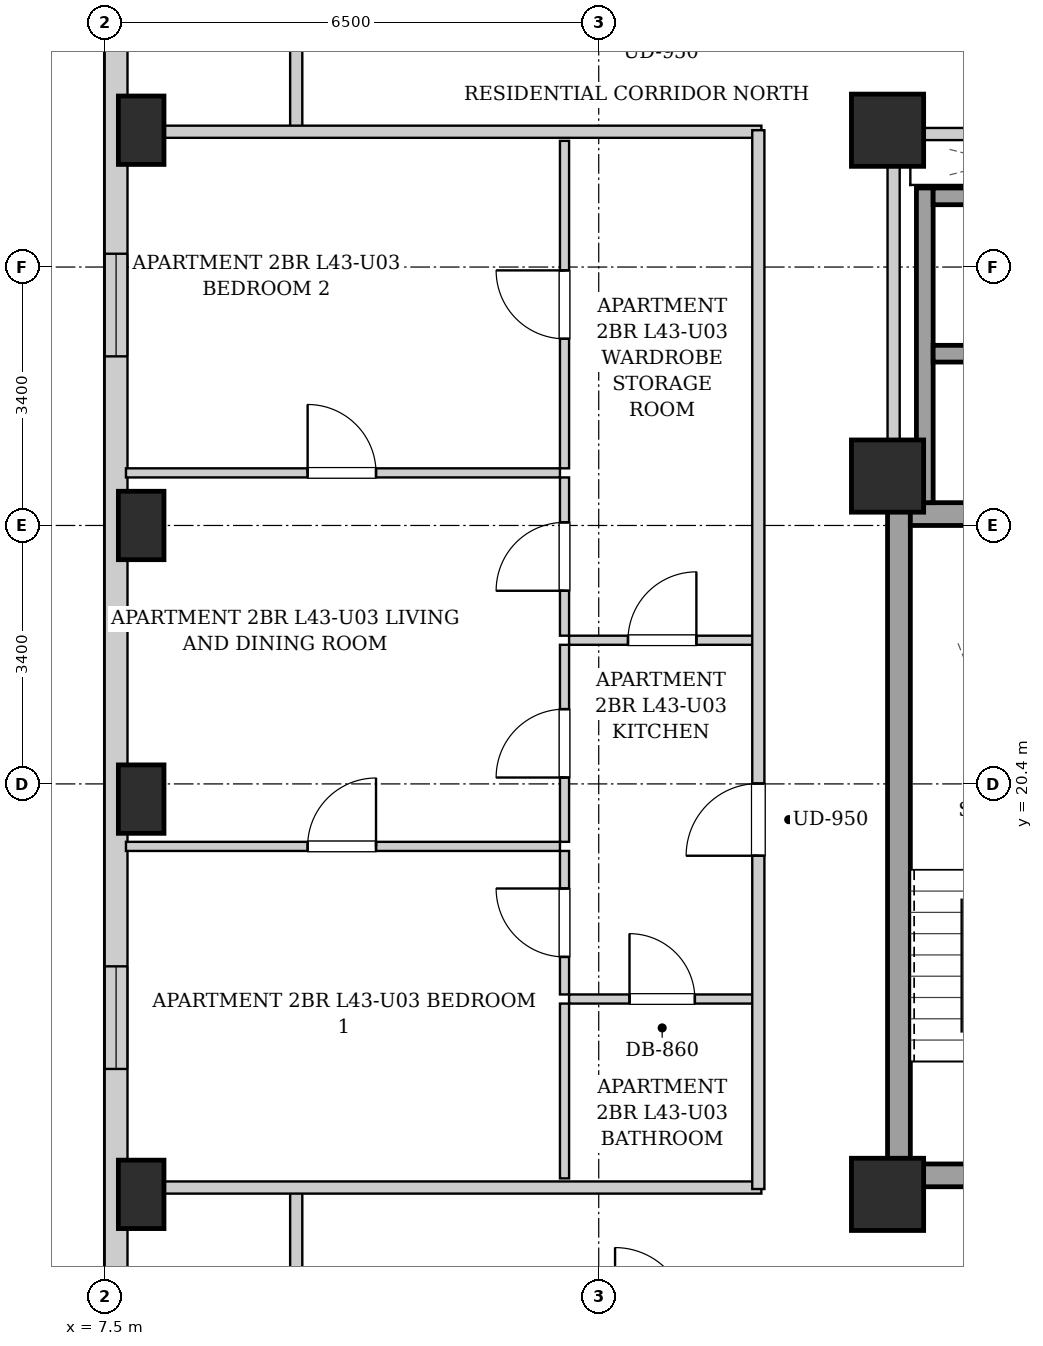
"""IFC4 building model, lengths in metres.
Left out: names, types, materials, properties, quantities, classifications, styles, units other than length and angle.
Written with IfcOpenShell. Run it as: python <this file> out.ifc"""

import sys

from ifc_helpers import new_model, si_unit, direction, frame, frame_2d, origin, origin_2d, place, context, subcontext, project, spatial, rectangle, extrude, element, fill, save


model = new_model("IFC4")
c1 = context("Model", 3, precision=1e-05, world=origin(), true_north=direction((0.0, 1.0)))
c2 = subcontext(c1, "Body", "Model", "MODEL_VIEW")
j1 = project(units=[si_unit("LENGTHUNIT", "METRE"), si_unit("PLANEANGLEUNIT", "RADIAN")], contexts=[c1])
p1 = place(None, origin())
s1 = spatial("IfcSite", under=j1, at=p1, CompositionType="ELEMENT")
p2 = place(p1, origin())
s2 = spatial("IfcBuilding", under=s1, at=p2, CompositionType="ELEMENT")
p3 = place(p2, frame((0.0, 0.0, 150.4)))
s3 = spatial("IfcBuildingStorey", under=s2, at=p3, CompositionType="ELEMENT", Elevation=150.4)
for number, where, z_axis, x_axis in (
    (1, (7.98, 15.0, 0.0), (0.0, 0.0, 1.0), (1.0, 0.0, 0.0)),
    (2, (7.98, 20.2, 0.0), (0.0, 0.0, 1.0), (1.0, 0.0, 0.0)),
    (3, (7.98, 23.8, 0.0), (0.0, 0.0, 1.0), (1.0, 0.0, 0.0)),
    (4, (7.98, 29.0, 0.0), (0.0, 0.0, 1.0), (1.0, 0.0, 0.0)),
):
    element("IfcColumn", number, at=place(p3, frame(where, z_axis=z_axis, x_axis=x_axis)), inside=s3, PredefinedType="COLUMN", context=c2, shape_type="SweptSolid", body=[
        extrude(rectangle(XDim=0.6, YDim=0.9, at=origin_2d()), origin(), (0.0, 0.0, 1.0), 3.25),
    ])
for number, where, z_axis, x_axis in (
    (5, (17.8, 15.0, 0.0), (0.0, 0.0, 1.0), (1.0, 0.0, 0.0)),
    (6, (17.8, 29.0, 0.0), (0.0, 0.0, 1.0), (1.0, 0.0, 0.0)),
    (7, (17.8, 24.45, 0.0), (0.0, 0.0, 1.0), (1.0, 0.0, 0.0)),
):
    element("IfcColumn", number, at=place(p3, frame(where, z_axis=z_axis, x_axis=x_axis)), inside=s3, PredefinedType="COLUMN", context=c2, shape_type="SweptSolid", body=[
        extrude(rectangle(XDim=0.95, YDim=0.95, at=origin_2d()), origin(), (0.0, 0.0, 1.0), 3.25),
    ])
p4 = place(p3, frame((7.65, 6.3, 0.0), z_axis=(0.0, 0.0, 1.0), x_axis=(0.0, 1.0, 0.0)))
e8 = element("IfcWall", 8, at=p4, inside=s3, PredefinedType="SOLIDWALL", context=c2, shape_type="SweptSolid", body=[
    extrude(rectangle(XDim=34.5, YDim=0.3, at=frame_2d((17.25, 0.0))), origin(), (0.0, 0.0, 1.0), 2.99),
])
p5 = place(p4, frame((1.425, 0.0, 0.55)))
e9 = element("IfcOpeningElement", 9, at=p5, cuts=e8, PredefinedType="OPENING", context=c2, shape_type="SweptSolid", body=[
    extrude(rectangle(XDim=1.35, YDim=1.2, at=frame_2d((0.675, 0.6))), frame((0.0, 0.16, 0.0), z_axis=(0.0, -1.0, 0.0), x_axis=(1.0, 0.0, 0.0)), (0.0, 0.0, 1.0), 0.32),
])
p6 = place(p4, frame((30.15, 0.0, 0.55)))
e10 = element("IfcOpeningElement", 10, at=p6, cuts=e8, PredefinedType="OPENING", context=c2, shape_type="SweptSolid", body=[
    extrude(rectangle(XDim=1.35, YDim=1.2, at=frame_2d((0.675, 0.6))), frame((0.0, 0.16, 0.0), z_axis=(0.0, -1.0, 0.0), x_axis=(1.0, 0.0, 0.0)), (0.0, 0.0, 1.0), 0.32),
])
p7 = place(p4, frame((28.31, 0.0, 0.55)))
e11 = element("IfcOpeningElement", 11, at=p7, cuts=e8, PredefinedType="OPENING", context=c2, shape_type="SweptSolid", body=[
    extrude(rectangle(XDim=1.35, YDim=1.2, at=frame_2d((0.675, 0.6))), frame((0.0, 0.16, 0.0), z_axis=(0.0, -1.0, 0.0), x_axis=(1.0, 0.0, 0.0)), (0.0, 0.0, 1.0), 0.32),
])
p8 = place(p4, frame((10.35, 0.0, 0.55)))
e12 = element("IfcOpeningElement", 12, at=p8, cuts=e8, PredefinedType="OPENING", context=c2, shape_type="SweptSolid", body=[
    extrude(rectangle(XDim=1.35, YDim=1.2, at=frame_2d((0.675, 0.6))), frame((0.0, 0.16, 0.0), z_axis=(0.0, -1.0, 0.0), x_axis=(1.0, 0.0, 0.0)), (0.0, 0.0, 1.0), 0.32),
])
p9 = place(p4, frame((19.725, 0.0, 0.55)))
e13 = element("IfcOpeningElement", 13, at=p9, cuts=e8, PredefinedType="OPENING", context=c2, shape_type="SweptSolid", body=[
    extrude(rectangle(XDim=1.35, YDim=1.2, at=frame_2d((0.675, 0.6))), frame((0.0, 0.16, 0.0), z_axis=(0.0, -1.0, 0.0), x_axis=(1.0, 0.0, 0.0)), (0.0, 0.0, 1.0), 0.32),
])
p10 = place(p3, frame((17.95, 15.1, 0.0), z_axis=(0.0, 0.0, 1.0), x_axis=(0.0, 1.0, 0.0)))
e14 = element("IfcWall", 14, at=p10, inside=s3, PredefinedType="SHEAR", context=c2, shape_type="SweptSolid", body=[
    extrude(rectangle(XDim=9.0, YDim=0.3, at=frame_2d((4.5, 0.0))), origin(), (0.0, 0.0, 1.0), 2.99),
])
p11 = place(p3, frame((18.1, 23.95, 0.0), z_axis=(0.0, 0.0, 1.0), x_axis=(1.0, 0.0, 0.0)))
e15 = element("IfcWall", 15, at=p11, inside=s3, PredefinedType="SHEAR", context=c2, shape_type="SweptSolid", body=[
    extrude(rectangle(XDim=2.85, YDim=0.3, at=frame_2d((1.425, 0.0))), origin(), (0.0, 0.0, 1.0), 2.99),
])
p12 = place(p3, frame((18.1, 15.25, 0.0), z_axis=(0.0, 0.0, 1.0), x_axis=(1.0, 0.0, 0.0)))
e16 = element("IfcWall", 16, at=p12, inside=s3, PredefinedType="SHEAR", context=c2, shape_type="SweptSolid", body=[
    extrude(rectangle(XDim=2.85, YDim=0.3, at=frame_2d((1.425, 0.0))), origin(), (0.0, 0.0, 1.0), 2.99),
])
p13 = place(p12, frame((0.86, 0.0, 0.0)))
e17 = element("IfcOpeningElement", 17, at=p13, cuts=e16, PredefinedType="OPENING", context=c2, shape_type="SweptSolid", body=[
    extrude(rectangle(XDim=1.1, YDim=2.05, at=frame_2d((0.55, 1.025))), frame((0.0, 0.16, 0.0), z_axis=(0.0, -1.0, 0.0), x_axis=(1.0, 0.0, 0.0)), (0.0, 0.0, 1.0), 0.32),
])
p14 = place(p3, frame((18.29, 24.1, 0.0), z_axis=(0.0, 0.0, 1.0), x_axis=(0.0, 1.0, 0.0)))
e18 = element("IfcWall", 18, at=p14, inside=s3, PredefinedType="SHEAR", context=c2, shape_type="SweptSolid", body=[
    extrude(rectangle(XDim=4.14, YDim=0.22, at=frame_2d((2.07, 0.0))), origin(), (0.0, 0.0, 1.0), 2.99),
])
for number, where, z_axis, x_axis in (
    (19, (18.4, 26.06, 0.0), (0.0, 0.0, 1.0), (1.0, 0.0, 0.0)),
    (20, (18.4, 28.13, 0.0), (0.0, 0.0, 1.0), (1.0, 0.0, 0.0)),
):
    element("IfcWall", number, at=place(p3, frame(where, z_axis=z_axis, x_axis=x_axis)), inside=s3, PredefinedType="SHEAR", context=c2, shape_type="SweptSolid", body=[
        extrude(rectangle(XDim=1.9, YDim=0.22, at=frame_2d((0.95, 0.0))), origin(), (0.0, 0.0, 1.0), 2.99),
    ])
p15 = place(p3, frame((17.88, 24.12, 0.0), z_axis=(0.0, 0.0, 1.0), x_axis=(0.0, 1.0, 0.0)))
e21 = element("IfcWall", 21, at=p15, inside=s3, PredefinedType="PARTITIONING", context=c2, shape_type="SweptSolid", body=[
    extrude(rectangle(XDim=4.76, YDim=0.16, at=frame_2d((2.38, 0.0))), origin(), (0.0, 0.0, 1.0), 2.99),
])
p16 = place(p3, frame((17.96, 28.95, 0.0), z_axis=(0.0, 0.0, 1.0), x_axis=(1.0, 0.0, 0.0)))
e22 = element("IfcWall", 22, at=p16, inside=s3, PredefinedType="PARTITIONING", context=c2, shape_type="SweptSolid", body=[
    extrude(rectangle(XDim=4.29, YDim=0.16, at=frame_2d((2.145, 0.0))), origin(), (0.0, 0.0, 1.0), 2.442),
])
p17 = place(p16, frame((1.695, 0.0, 0.0)))
e23 = element("IfcOpeningElement", 23, at=p17, cuts=e22, PredefinedType="OPENING", context=c2, shape_type="SweptSolid", body=[
    extrude(rectangle(XDim=0.86, YDim=2.05, at=frame_2d((0.43, 1.025))), frame((0.0, 0.09, 0.0), z_axis=(0.0, -1.0, 0.0), x_axis=(1.0, 0.0, 0.0)), (0.0, 0.0, 1.0), 0.18),
])
for number, where, z_axis, x_axis in (
    (24, (10.02, 13.35, 0.0), (0.0, 0.0, 1.0), (0.0, 1.0, 0.0)),
    (25, (10.02, 28.98, 0.0), (0.0, 0.0, 1.0), (0.0, 1.0, 0.0)),
):
    element("IfcWall", number, at=place(p3, frame(where, z_axis=z_axis, x_axis=x_axis)), inside=s3, PredefinedType="PARTITIONING", context=c2, shape_type="SweptSolid", body=[
        extrude(rectangle(XDim=1.74, YDim=0.16, at=frame_2d((0.87, 0.0))), origin(), (0.0, 0.0, 1.0), 2.99),
    ])
for number, where, z_axis, x_axis in (
    (26, (7.78, 15.09, 0.0), (0.0, 0.0, 1.0), (1.0, 0.0, 0.0)),
    (27, (7.78, 28.98, 0.0), (0.0, 0.0, 1.0), (1.0, 0.0, 0.0)),
):
    element("IfcWall", number, at=place(p3, frame(where, z_axis=z_axis, x_axis=x_axis)), inside=s3, PredefinedType="PARTITIONING", context=c2, shape_type="SweptSolid", body=[
        extrude(rectangle(XDim=8.36, YDim=0.16, at=frame_2d((4.18, 0.0))), origin(), (0.0, 0.0, 1.0), 2.442),
    ])
p18 = place(p3, frame((13.61, 22.29, 0.0), z_axis=(0.0, 0.0, 1.0), x_axis=(1.0, 0.0, 0.0)))
e28 = element("IfcWall", 28, at=p18, inside=s3, PredefinedType="PARTITIONING", context=c2, shape_type="SweptSolid", body=[
    extrude(rectangle(XDim=2.45, YDim=0.12, at=frame_2d((1.225, 0.0))), origin(), (0.0, 0.0, 1.0), 2.99),
])
p19 = place(p18, frame((0.775, 0.0, 0.0)))
e29 = element("IfcOpeningElement", 29, at=p19, cuts=e28, PredefinedType="OPENING", context=c2, shape_type="SweptSolid", body=[
    extrude(rectangle(XDim=0.9, YDim=2.05, at=frame_2d((0.45, 1.025))), frame((0.0, 0.07, 0.0), z_axis=(0.0, -1.0, 0.0), x_axis=(1.0, 0.0, 0.0)), (0.0, 0.0, 1.0), 0.14),
])
p20 = place(p3, frame((13.55, 22.35, 0.0), z_axis=(0.0, 0.0, 1.0), x_axis=(0.0, 1.0, 0.0)))
e30 = element("IfcWall", 30, at=p20, inside=s3, PredefinedType="PARTITIONING", context=c2, shape_type="SweptSolid", body=[
    extrude(rectangle(XDim=2.082, YDim=0.12, at=frame_2d((1.041, 0.0))), origin(), (0.0, 0.0, 1.0), 2.99),
])
p21 = place(p20, frame((0.591, 0.0, 0.0)))
e31 = element("IfcOpeningElement", 31, at=p21, cuts=e30, PredefinedType="OPENING", context=c2, shape_type="SweptSolid", body=[
    extrude(rectangle(XDim=0.9, YDim=2.05, at=frame_2d((0.45, 1.025))), frame((0.0, 0.07, 0.0), z_axis=(0.0, -1.0, 0.0), x_axis=(1.0, 0.0, 0.0)), (0.0, 0.0, 1.0), 0.14),
])
p22 = place(p3, frame((13.55, 24.552, 0.0), z_axis=(0.0, 0.0, 1.0), x_axis=(0.0, 1.0, 0.0)))
e32 = element("IfcWall", 32, at=p22, inside=s3, PredefinedType="PARTITIONING", context=c2, shape_type="SweptSolid", body=[
    extrude(rectangle(XDim=4.308, YDim=0.12, at=frame_2d((2.154, 0.0))), origin(), (0.0, 0.0, 1.0), 2.99),
])
p23 = place(p22, frame((1.704, 0.0, 0.0)))
e33 = element("IfcOpeningElement", 33, at=p23, cuts=e32, PredefinedType="OPENING", context=c2, shape_type="SweptSolid", body=[
    extrude(rectangle(XDim=0.9, YDim=2.05, at=frame_2d((0.45, 1.025))), frame((0.0, 0.07, 0.0), z_axis=(0.0, -1.0, 0.0), x_axis=(1.0, 0.0, 0.0)), (0.0, 0.0, 1.0), 0.14),
])
p24 = place(p3, frame((13.61, 17.57, 0.0), z_axis=(0.0, 0.0, 1.0), x_axis=(1.0, 0.0, 0.0)))
e34 = element("IfcWall", 34, at=p24, inside=s3, PredefinedType="PARTITIONING", context=c2, shape_type="SweptSolid", body=[
    extrude(rectangle(XDim=2.45, YDim=0.12, at=frame_2d((1.225, 0.0))), origin(), (0.0, 0.0, 1.0), 2.99),
])
p25 = place(p24, frame((0.795, 0.0, 0.0)))
e35 = element("IfcOpeningElement", 35, at=p25, cuts=e34, PredefinedType="OPENING", context=c2, shape_type="SweptSolid", body=[
    extrude(rectangle(XDim=0.86, YDim=2.05, at=frame_2d((0.43, 1.025))), frame((0.0, 0.07, 0.0), z_axis=(0.0, -1.0, 0.0), x_axis=(1.0, 0.0, 0.0)), (0.0, 0.0, 1.0), 0.14),
])
p26 = place(p3, frame((13.55, 15.21, 0.0), z_axis=(0.0, 0.0, 1.0), x_axis=(0.0, 1.0, 0.0)))
e36 = element("IfcWall", 36, at=p26, inside=s3, PredefinedType="PARTITIONING", context=c2, shape_type="SweptSolid", body=[
    extrude(rectangle(XDim=2.3, YDim=0.12, at=frame_2d((1.15, 0.0))), origin(), (0.0, 0.0, 1.0), 2.99),
])
p27 = place(p3, frame((13.55, 17.63, 0.0), z_axis=(0.0, 0.0, 1.0), x_axis=(0.0, 1.0, 0.0)))
e37 = element("IfcWall", 37, at=p27, inside=s3, PredefinedType="PARTITIONING", context=c2, shape_type="SweptSolid", body=[
    extrude(rectangle(XDim=1.888, YDim=0.12, at=frame_2d((0.944, 0.0))), origin(), (0.0, 0.0, 1.0), 2.99),
])
p28 = place(p27, frame((0.494, 0.0, 0.0)))
e38 = element("IfcOpeningElement", 38, at=p28, cuts=e37, PredefinedType="OPENING", context=c2, shape_type="SweptSolid", body=[
    extrude(rectangle(XDim=0.9, YDim=2.05, at=frame_2d((0.45, 1.025))), frame((0.0, 0.07, 0.0), z_axis=(0.0, -1.0, 0.0), x_axis=(1.0, 0.0, 0.0)), (0.0, 0.0, 1.0), 0.14),
])
p29 = place(p3, frame((13.55, 19.638, 0.0), z_axis=(0.0, 0.0, 1.0), x_axis=(0.0, 1.0, 0.0)))
e39 = element("IfcWall", 39, at=p29, inside=s3, PredefinedType="PARTITIONING", context=c2, shape_type="SweptSolid", body=[
    extrude(rectangle(XDim=2.592, YDim=0.12, at=frame_2d((1.296, 0.0))), origin(), (0.0, 0.0, 1.0), 2.99),
])
p30 = place(p29, frame((0.846, 0.0, 0.0)))
e40 = element("IfcOpeningElement", 40, at=p30, cuts=e39, PredefinedType="OPENING", context=c2, shape_type="SweptSolid", body=[
    extrude(rectangle(XDim=0.9, YDim=2.05, at=frame_2d((0.45, 1.025))), frame((0.0, 0.07, 0.0), z_axis=(0.0, -1.0, 0.0), x_axis=(1.0, 0.0, 0.0)), (0.0, 0.0, 1.0), 0.14),
])
p31 = place(p3, frame((7.78, 19.578, 0.0), z_axis=(0.0, 0.0, 1.0), x_axis=(1.0, 0.0, 0.0)))
e41 = element("IfcWall", 41, at=p31, inside=s3, PredefinedType="PARTITIONING", context=c2, shape_type="SweptSolid", body=[
    extrude(rectangle(XDim=5.71, YDim=0.12, at=frame_2d((2.855, 0.0))), origin(), (0.0, 0.0, 1.0), 2.99),
])
p32 = place(p31, frame((2.39, 0.0, 0.0)))
e42 = element("IfcOpeningElement", 42, at=p32, cuts=e41, PredefinedType="OPENING", context=c2, shape_type="SweptSolid", body=[
    extrude(rectangle(XDim=0.9, YDim=2.05, at=frame_2d((0.45, 1.025))), frame((0.0, 0.07, 0.0), z_axis=(0.0, -1.0, 0.0), x_axis=(1.0, 0.0, 0.0)), (0.0, 0.0, 1.0), 0.14),
])
p33 = place(p3, frame((7.78, 24.492, 0.0), z_axis=(0.0, 0.0, 1.0), x_axis=(1.0, 0.0, 0.0)))
e43 = element("IfcWall", 43, at=p33, inside=s3, PredefinedType="PARTITIONING", context=c2, shape_type="SweptSolid", body=[
    extrude(rectangle(XDim=5.71, YDim=0.12, at=frame_2d((2.855, 0.0))), origin(), (0.0, 0.0, 1.0), 2.621),
])
p34 = place(p33, frame((2.39, 0.0, 0.0)))
e44 = element("IfcOpeningElement", 44, at=p34, cuts=e43, PredefinedType="OPENING", context=c2, shape_type="SweptSolid", body=[
    extrude(rectangle(XDim=0.9, YDim=2.05, at=frame_2d((0.45, 1.025))), frame((0.0, 0.07, 0.0), z_axis=(0.0, -1.0, 0.0), x_axis=(1.0, 0.0, 0.0)), (0.0, 0.0, 1.0), 0.14),
])
p35 = place(p3, frame((16.1, 15.07, 0.0), z_axis=(0.0, 0.0, 1.0), x_axis=(0.0, 1.0, 0.0)))
e45 = element("IfcWall", 45, at=p35, inside=s3, PredefinedType="PARTITIONING", context=c2, shape_type="SweptSolid", body=[
    extrude(rectangle(XDim=13.93, YDim=0.16, at=frame_2d((6.965, 0.0))), origin(), (0.0, 0.0, 1.0), 2.99),
])
p36 = place(p35, frame((4.385, 0.0, 0.0)))
e46 = element("IfcOpeningElement", 46, at=p36, cuts=e45, PredefinedType="OPENING", context=c2, shape_type="SweptSolid", body=[
    extrude(rectangle(XDim=0.95, YDim=2.1, at=frame_2d((0.475, 1.05))), frame((0.0, 0.09, 0.0), z_axis=(0.0, -1.0, 0.0), x_axis=(1.0, 0.0, 0.0)), (0.0, 0.0, 1.0), 0.18),
])
p37 = place(p19, origin())
e47 = element("IfcDoor", 47, at=p37, inside=s3, OperationType="SINGLE_SWING_RIGHT", PredefinedType="DOOR", context=c2, shape_type="SweptSolid", body=[
    extrude(rectangle(XDim=0.9, YDim=2.05, at=frame_2d((0.45, 1.025))), frame((0.0, 0.025, 0.0), z_axis=(0.0, -1.0, 0.0), x_axis=(1.0, 0.0, 0.0)), (0.0, 0.0, 1.0), 0.05),
])
fill(e29, e47)
p38 = place(p21, origin())
e48 = element("IfcDoor", 48, at=p38, inside=s3, OperationType="SINGLE_SWING_LEFT", PredefinedType="DOOR", context=c2, shape_type="SweptSolid", body=[
    extrude(rectangle(XDim=0.9, YDim=2.05, at=frame_2d((0.45, 1.025))), frame((0.0, 0.025, 0.0), z_axis=(0.0, -1.0, 0.0), x_axis=(1.0, 0.0, 0.0)), (0.0, 0.0, 1.0), 0.05),
])
fill(e31, e48)
p39 = place(p23, origin())
e49 = element("IfcDoor", 49, at=p39, inside=s3, OperationType="SINGLE_SWING_RIGHT", PredefinedType="DOOR", context=c2, shape_type="SweptSolid", body=[
    extrude(rectangle(XDim=0.9, YDim=2.05, at=frame_2d((0.45, 1.025))), frame((0.0, 0.025, 0.0), z_axis=(0.0, -1.0, 0.0), x_axis=(1.0, 0.0, 0.0)), (0.0, 0.0, 1.0), 0.05),
])
fill(e33, e49)
p40 = place(p25, origin())
e50 = element("IfcDoor", 50, at=p40, inside=s3, OperationType="SINGLE_SWING_LEFT", PredefinedType="DOOR", context=c2, shape_type="SweptSolid", body=[
    extrude(rectangle(XDim=0.86, YDim=2.05, at=frame_2d((0.43, 1.025))), frame((0.0, 0.025, 0.0), z_axis=(0.0, -1.0, 0.0), x_axis=(1.0, 0.0, 0.0)), (0.0, 0.0, 1.0), 0.05),
])
fill(e35, e50)
p41 = place(p28, origin())
e51 = element("IfcDoor", 51, at=p41, inside=s3, OperationType="SINGLE_SWING_RIGHT", PredefinedType="DOOR", context=c2, shape_type="SweptSolid", body=[
    extrude(rectangle(XDim=0.9, YDim=2.05, at=frame_2d((0.45, 1.025))), frame((0.0, 0.025, 0.0), z_axis=(0.0, -1.0, 0.0), x_axis=(1.0, 0.0, 0.0)), (0.0, 0.0, 1.0), 0.05),
])
fill(e38, e51)
p42 = place(p30, origin())
e52 = element("IfcDoor", 52, at=p42, inside=s3, OperationType="SINGLE_SWING_LEFT", PredefinedType="DOOR", context=c2, shape_type="SweptSolid", body=[
    extrude(rectangle(XDim=0.9, YDim=2.05, at=frame_2d((0.45, 1.025))), frame((0.0, 0.025, 0.0), z_axis=(0.0, -1.0, 0.0), x_axis=(1.0, 0.0, 0.0)), (0.0, 0.0, 1.0), 0.05),
])
fill(e40, e52)
p43 = place(p32, origin())
e53 = element("IfcDoor", 53, at=p43, inside=s3, OperationType="SINGLE_SWING_RIGHT", PredefinedType="DOOR", context=c2, shape_type="SweptSolid", body=[
    extrude(rectangle(XDim=0.9, YDim=2.05, at=frame_2d((0.45, 1.025))), frame((0.0, 0.025, 0.0), z_axis=(0.0, -1.0, 0.0), x_axis=(1.0, 0.0, 0.0)), (0.0, 0.0, 1.0), 0.05),
])
fill(e42, e53)
p44 = place(p34, origin())
e54 = element("IfcDoor", 54, at=p44, inside=s3, OperationType="SINGLE_SWING_LEFT", PredefinedType="DOOR", context=c2, shape_type="SweptSolid", body=[
    extrude(rectangle(XDim=0.9, YDim=2.05, at=frame_2d((0.45, 1.025))), frame((0.0, 0.025, 0.0), z_axis=(0.0, -1.0, 0.0), x_axis=(1.0, 0.0, 0.0)), (0.0, 0.0, 1.0), 0.05),
])
fill(e44, e54)
p45 = place(p36, origin())
e55 = element("IfcDoor", 55, at=p45, inside=s3, OperationType="SINGLE_SWING_LEFT", PredefinedType="DOOR", context=c2, shape_type="SweptSolid", body=[
    extrude(rectangle(XDim=0.95, YDim=2.1, at=frame_2d((0.475, 1.05))), frame((0.0, 0.025, 0.0), z_axis=(0.0, -1.0, 0.0), x_axis=(1.0, 0.0, 0.0)), (0.0, 0.0, 1.0), 0.05),
])
fill(e46, e55)
p46 = place(p8, origin())
e56 = element("IfcWindow", 56, at=p46, inside=s3, PartitioningType="SINGLE_PANEL", PredefinedType="WINDOW", context=c2, shape_type="SweptSolid", body=[
    extrude(rectangle(XDim=1.35, YDim=1.2, at=frame_2d((0.675, 0.6))), frame((0.0, 0.03, 0.0), z_axis=(0.0, -1.0, 0.0), x_axis=(1.0, 0.0, 0.0)), (0.0, 0.0, 1.0), 0.06),
])
fill(e12, e56)
p47 = place(p9, origin())
e57 = element("IfcWindow", 57, at=p47, inside=s3, PartitioningType="SINGLE_PANEL", PredefinedType="WINDOW", context=c2, shape_type="SweptSolid", body=[
    extrude(rectangle(XDim=1.35, YDim=1.2, at=frame_2d((0.675, 0.6))), frame((0.0, 0.03, 0.0), z_axis=(0.0, -1.0, 0.0), x_axis=(1.0, 0.0, 0.0)), (0.0, 0.0, 1.0), 0.06),
])
fill(e13, e57)
save(model, sys.argv[1])
